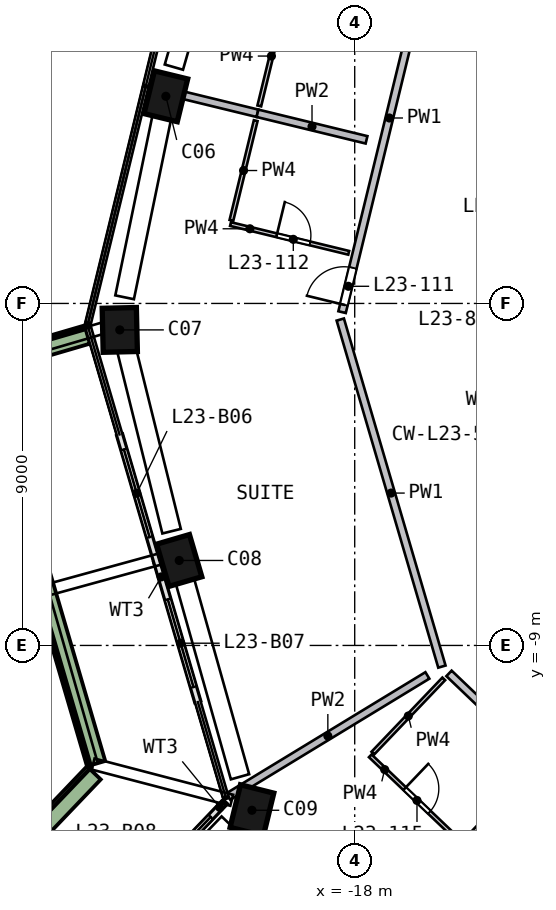
"""IFC4 building model, lengths in metres.
Left out: names, types, materials, properties, quantities, classifications, styles, units other than length and angle.
Written with IfcOpenShell. Run it as: python <this file> out.ifc"""

import sys

from ifc_helpers import new_model, si_unit, direction, frame, frame_2d, origin, origin_2d, place, context, subcontext, project, spatial, rectangle, extrude, element, fill, save


model = new_model("IFC4")
c1 = context("Model", 3, precision=1e-05, world=origin(), true_north=direction((0.0, 1.0)))
c2 = subcontext(c1, "Body", "Model", "MODEL_VIEW")
j1 = project(units=[si_unit("LENGTHUNIT", "METRE"), si_unit("PLANEANGLEUNIT", "RADIAN")], contexts=[c1])
p1 = place(None, origin())
s1 = spatial("IfcSite", under=j1, at=p1, CompositionType="ELEMENT")
p2 = place(p1, origin())
s2 = spatial("IfcBuilding", under=s1, at=p2, CompositionType="ELEMENT")
p3 = place(p2, frame((0.0, 0.0, 100.0)))
s3 = spatial("IfcBuildingStorey", under=s2, at=p3, CompositionType="ELEMENT", Elevation=100.0)
p4 = place(p3, frame((-22.939, 5.583, 0.0), z_axis=(-0.025629126, -0.109285026, 0.993679994), x_axis=(-0.235079586, -0.965473156, -0.112246039)))
e1 = element("IfcColumn", 1, at=p4, inside=s3, PredefinedType="COLUMN", context=c2, shape_type="SweptSolid", body=[
    extrude(rectangle(XDim=1.15, YDim=0.9, at=origin_2d()), origin(), (0.0, 0.0, 1.0), 3.21),
])
p5 = place(p3, frame((-24.186, -0.557, 0.0), z_axis=(0.003573254, -0.114952338, 0.993364582), x_axis=(-0.022433132, 0.993111719, 0.115003771)))
e2 = element("IfcColumn", 2, at=p5, inside=s3, PredefinedType="COLUMN", context=c2, shape_type="SweptSolid", body=[
    extrude(rectangle(XDim=1.15, YDim=0.9, at=origin_2d()), origin(), (0.0, 0.0, 1.0), 3.211),
])
p6 = place(p3, frame((-22.657, -6.634, 0.0), z_axis=(0.032397695, -0.10745996, 0.993681411), x_axis=(0.278746305, -0.953784116, -0.112233498)))
e3 = element("IfcColumn", 3, at=p6, inside=s3, PredefinedType="COLUMN", context=c2, shape_type="SweptSolid", body=[
    extrude(rectangle(XDim=1.15, YDim=0.9, at=origin_2d()), origin(), (0.0, 0.0, 1.0), 3.21),
])
p7 = place(p3, frame((-20.781, -13.219, 0.0), z_axis=(0.063694576, -0.098278146, 0.993118526), x_axis=(0.242274469, 0.966891915, 0.080144286)))
e4 = element("IfcColumn", 4, at=p7, inside=s3, PredefinedType="COLUMN", context=c2, shape_type="SweptSolid", body=[
    extrude(rectangle(XDim=1.15, YDim=0.9, at=origin_2d()), origin(), (0.0, 0.0, 1.0), 3.212),
])
p8 = place(p3, frame((-24.185, -3.461, 0.0), z_axis=(0.0, 0.0, 1.0), x_axis=(0.28096031, -0.959719388, 0.0)))
e5 = element("IfcWall", 5, at=p8, inside=s3, PredefinedType="SOLIDWALL", context=c2, shape_type="SweptSolid", body=[
    extrude(rectangle(XDim=3.475, YDim=0.15, at=frame_2d((1.737, 0.0))), origin(), (0.0, 0.0, 1.0), 2.425),
])
p9 = place(p8, frame((0.4, 0.0, 0.0)))
e6 = element("IfcOpeningElement", 6, at=p9, cuts=e5, PredefinedType="OPENING", context=c2, shape_type="SweptSolid", body=[
    extrude(rectangle(XDim=2.4, YDim=2.4, at=frame_2d((1.2, 1.2))), frame((0.0, 0.085, 0.0), z_axis=(0.0, -1.0, 0.0), x_axis=(1.0, 0.0, 0.0)), (0.0, 0.0, 1.0), 0.17),
])
p10 = place(p3, frame((-23.209, -6.796, 0.0), z_axis=(0.0, 0.0, 1.0), x_axis=(0.281028882, -0.959699311, 0.0)))
e7 = element("IfcWall", 7, at=p10, inside=s3, PredefinedType="SOLIDWALL", context=c2, shape_type="SweptSolid", body=[
    extrude(rectangle(XDim=3.835, YDim=0.15, at=frame_2d((1.918, 0.0))), origin(), (0.0, 0.0, 1.0), 2.425),
])
p11 = place(p10, frame((1.035, 0.0, 0.0)))
e8 = element("IfcOpeningElement", 8, at=p11, cuts=e7, PredefinedType="OPENING", context=c2, shape_type="SweptSolid", body=[
    extrude(rectangle(XDim=2.4, YDim=2.4, at=frame_2d((1.2, 1.2))), frame((0.0, 0.085, 0.0), z_axis=(0.0, -1.0, 0.0), x_axis=(1.0, 0.0, 0.0)), (0.0, 0.0, 1.0), 0.17),
])
p12 = place(p3, frame((-21.448, -13.157, 0.0), z_axis=(0.0, 0.0, 1.0), x_axis=(-0.690648505, -0.723190599, 0.0)))
e9 = element("IfcWall", 9, at=p12, inside=s3, PredefinedType="SOLIDWALL", context=c2, shape_type="SweptSolid", body=[
    extrude(rectangle(XDim=3.293, YDim=0.15, at=frame_2d((1.647, 0.0))), origin(), (0.0, 0.0, 1.0), 2.425),
])
p13 = place(p12, frame((0.494, 0.0, 0.0)))
e10 = element("IfcOpeningElement", 10, at=p13, cuts=e9, PredefinedType="OPENING", context=c2, shape_type="SweptSolid", body=[
    extrude(rectangle(XDim=2.4, YDim=2.4, at=frame_2d((1.2, 1.2))), frame((0.0, 0.085, 0.0), z_axis=(0.0, -1.0, 0.0), x_axis=(1.0, 0.0, 0.0)), (0.0, 0.0, 1.0), 0.17),
])
p14 = place(p3, frame((-25.038, -0.819, 0.0), z_axis=(0.0, 0.0, 1.0), x_axis=(-0.959706288, -0.281005054, 0.0)))
e11 = element("IfcWall", 11, at=p14, inside=s3, PredefinedType="SOLIDWALL", context=c2, shape_type="SweptSolid", body=[
    extrude(rectangle(XDim=3.199, YDim=0.5, at=frame_2d((1.6, 0.0))), origin(), (0.0, 0.0, 1.0), 0.7),
])
p15 = place(p3, frame((-27.798, -1.887, 0.0), z_axis=(0.0, 0.0, 1.0), x_axis=(0.281008423, -0.959705302, 0.0)))
e12 = element("IfcWall", 12, at=p15, inside=s3, PredefinedType="SOLIDWALL", context=c2, shape_type="SweptSolid", body=[
    extrude(rectangle(XDim=10.652, YDim=0.5, at=frame_2d((5.326, 0.0))), origin(), (0.0, 0.0, 1.0), 0.7),
])
p16 = place(p3, frame((-24.864, -12.354, 0.0), z_axis=(0.0, 0.0, 1.0), x_axis=(-0.690631429, -0.723206907, 0.0)))
e13 = element("IfcWall", 13, at=p16, inside=s3, PredefinedType="SOLIDWALL", context=c2, shape_type="SweptSolid", body=[
    extrude(rectangle(XDim=9.361, YDim=0.5, at=frame_2d((4.68, 0.0))), origin(), (0.0, 0.0, 1.0), 0.7),
])
p17 = place(p3, frame((-25.29, -24.89, 0.0), z_axis=(0.0, 0.0, 1.0), x_axis=(0.690632268, 0.723206105, 0.0)))
e14 = element("IfcWall", 14, at=p17, inside=s3, PredefinedType="SOLIDWALL", context=c2, shape_type="SweptSolid", body=[
    extrude(rectangle(XDim=17.508, YDim=0.2, at=frame_2d((8.754, 0.0))), origin(), (0.0, 0.0, 1.0), 3.19),
])
p18 = place(p17, frame((2.3, 0.0, 0.0)))
e15 = element("IfcOpeningElement", 15, at=p18, cuts=e14, PredefinedType="OPENING", context=c2, shape_type="SweptSolid", body=[
    extrude(rectangle(XDim=1.0, YDim=2.1, at=frame_2d((0.5, 1.05))), frame((0.0, 0.11, 0.0), z_axis=(0.0, -1.0, 0.0), x_axis=(1.0, 0.0, 0.0)), (0.0, 0.0, 1.0), 0.22),
])
p19 = place(p3, frame((-11.607, -13.747, 0.0), z_axis=(0.0, 0.0, 1.0), x_axis=(-0.690632268, -0.723206105, 0.0)))
e16 = element("IfcWall", 16, at=p19, inside=s3, PredefinedType="SOLIDWALL", context=c2, shape_type="SweptSolid", body=[
    extrude(rectangle(XDim=17.508, YDim=0.2, at=frame_2d((8.754, 0.0))), origin(), (0.0, 0.0, 1.0), 3.19),
])
p20 = place(p19, frame((6.8, 0.0, 0.0)))
e17 = element("IfcOpeningElement", 17, at=p20, cuts=e16, PredefinedType="OPENING", context=c2, shape_type="SweptSolid", body=[
    extrude(rectangle(XDim=1.0, YDim=2.1, at=frame_2d((0.5, 1.05))), frame((0.0, 0.11, 0.0), z_axis=(0.0, -1.0, 0.0), x_axis=(1.0, 0.0, 0.0)), (0.0, 0.0, 1.0), 0.22),
])
p21 = place(p3, frame((-18.333, -0.229, 0.0), z_axis=(0.0, 0.0, 1.0), x_axis=(0.236500551, 0.971631355, 0.0)))
e18 = element("IfcWall", 18, at=p21, inside=s3, PredefinedType="SOLIDWALL", context=c2, shape_type="SweptSolid", body=[
    extrude(rectangle(XDim=9.116, YDim=0.2, at=frame_2d((4.558, 0.0))), origin(), (0.0, 0.0, 1.0), 3.19),
])
p22 = place(p21, frame((0.2, 0.0, 0.0)))
e19 = element("IfcOpeningElement", 19, at=p22, cuts=e18, PredefinedType="OPENING", context=c2, shape_type="SweptSolid", body=[
    extrude(rectangle(XDim=1.0, YDim=2.1, at=frame_2d((0.5, 1.05))), frame((0.0, 0.11, 0.0), z_axis=(0.0, -1.0, 0.0), x_axis=(1.0, 0.0, 0.0)), (0.0, 0.0, 1.0), 0.22),
])
p23 = place(p3, frame((-18.38, -0.424, 0.0), z_axis=(0.0, 0.0, 1.0), x_axis=(0.280984056, -0.959712436, 0.0)))
e20 = element("IfcWall", 20, at=p23, inside=s3, PredefinedType="SOLIDWALL", context=c2, shape_type="SweptSolid", body=[
    extrude(rectangle(XDim=9.516, YDim=0.2, at=frame_2d((4.758, 0.0))), origin(), (0.0, 0.0, 1.0), 3.19),
])
p24 = place(p3, frame((-15.519, -9.735, 0.0), z_axis=(0.0, 0.0, 1.0), x_axis=(0.723184346, -0.690655053, 0.0)))
e21 = element("IfcWall", 21, at=p24, inside=s3, PredefinedType="SOLIDWALL", context=c2, shape_type="SweptSolid", body=[
    extrude(rectangle(XDim=3.4, YDim=0.2, at=frame_2d((1.7, 0.0))), origin(), (0.0, 0.0, 1.0), 3.19),
])
p25 = place(p3, frame((-20.558, 5.004, 0.0), z_axis=(0.0, 0.0, 1.0), x_axis=(-0.971623409, 0.236533194, 0.0)))
e22 = element("IfcWall", 22, at=p25, inside=s3, PredefinedType="SOLIDWALL", context=c2, shape_type="SweptSolid", body=[
    extrude(rectangle(XDim=2.95, YDim=0.2, at=frame_2d((1.475, 0.0))), origin(), (0.0, 0.0, 1.0), 3.19),
])
p26 = place(p3, frame((-17.689, 4.306, 0.0), z_axis=(0.0, 0.0, 1.0), x_axis=(-0.971636288, 0.236480281, 0.0)))
e23 = element("IfcWall", 23, at=p26, inside=s3, PredefinedType="SOLIDWALL", context=c2, shape_type="SweptSolid", body=[
    extrude(rectangle(XDim=2.953, YDim=0.2, at=frame_2d((1.476, 0.0))), origin(), (0.0, 0.0, 1.0), 3.19),
])
p27 = place(p3, frame((-16.088, -9.789, 0.0), z_axis=(0.0, 0.0, 1.0), x_axis=(-0.854272356, -0.519825684, 0.0)))
e24 = element("IfcWall", 24, at=p27, inside=s3, PredefinedType="SOLIDWALL", context=c2, shape_type="SweptSolid", body=[
    extrude(rectangle(XDim=6.132, YDim=0.2, at=frame_2d((3.066, 0.0))), origin(), (0.0, 0.0, 1.0), 3.19),
])
p28 = place(p3, frame((-21.244, 2.186, 0.0), z_axis=(0.0, 0.0, 1.0), x_axis=(0.23646695, 0.971639533, 0.0)))
e25 = element("IfcWall", 25, at=p28, inside=s3, PredefinedType="PARTITIONING", context=c2, shape_type="SweptSolid", body=[
    extrude(rectangle(XDim=2.7, YDim=0.1, at=frame_2d((1.35, 0.0))), origin(), (0.0, 0.0, 1.0), 3.19),
])
p29 = place(p3, frame((-19.872, 7.822, 0.0), z_axis=(0.0, 0.0, 1.0), x_axis=(-0.236446175, -0.971644588, 0.0)))
e26 = element("IfcWall", 26, at=p29, inside=s3, PredefinedType="PARTITIONING", context=c2, shape_type="SweptSolid", body=[
    extrude(rectangle(XDim=2.7, YDim=0.1, at=frame_2d((1.35, 0.0))), origin(), (0.0, 0.0, 1.0), 3.19),
])
p30 = place(p3, frame((-21.268, 2.089, 0.0), z_axis=(0.0, 0.0, 1.0), x_axis=(0.971627336, -0.236517059, 0.0)))
e27 = element("IfcWall", 27, at=p30, inside=s3, PredefinedType="PARTITIONING", context=c2, shape_type="SweptSolid", body=[
    extrude(rectangle(XDim=3.2, YDim=0.1, at=frame_2d((1.6, 0.0))), origin(), (0.0, 0.0, 1.0), 3.19),
])
p31 = place(p30, frame((1.25, 0.0, 0.0)))
e28 = element("IfcOpeningElement", 28, at=p31, cuts=e27, PredefinedType="OPENING", context=c2, shape_type="SweptSolid", body=[
    extrude(rectangle(XDim=0.9, YDim=2.1, at=frame_2d((0.45, 1.05))), frame((0.0, 0.06, 0.0), z_axis=(0.0, -1.0, 0.0), x_axis=(1.0, 0.0, 0.0)), (0.0, 0.0, 1.0), 0.12),
])
p32 = place(p3, frame((-15.657, -9.88, 0.0), z_axis=(0.0, 0.0, 1.0), x_axis=(-0.690643473, -0.723195404, 0.0)))
e29 = element("IfcWall", 29, at=p32, inside=s3, PredefinedType="PARTITIONING", context=c2, shape_type="SweptSolid", body=[
    extrude(rectangle(XDim=2.7, YDim=0.1, at=frame_2d((1.35, 0.0))), origin(), (0.0, 0.0, 1.0), 3.19),
])
p33 = place(p3, frame((-17.591, -11.905, 0.0), z_axis=(0.0, 0.0, 1.0), x_axis=(0.723208297, -0.690629972, 0.0)))
e30 = element("IfcWall", 30, at=p33, inside=s3, PredefinedType="PARTITIONING", context=c2, shape_type="SweptSolid", body=[
    extrude(rectangle(XDim=3.2, YDim=0.1, at=frame_2d((1.6, 0.0))), origin(), (0.0, 0.0, 1.0), 3.19),
])
p34 = place(p33, frame((1.25, 0.0, 0.0)))
e31 = element("IfcOpeningElement", 31, at=p34, cuts=e30, PredefinedType="OPENING", context=c2, shape_type="SweptSolid", body=[
    extrude(rectangle(XDim=0.9, YDim=2.1, at=frame_2d((0.45, 1.05))), frame((0.0, 0.06, 0.0), z_axis=(0.0, -1.0, 0.0), x_axis=(1.0, 0.0, 0.0)), (0.0, 0.0, 1.0), 0.12),
])
p35 = place(p9, origin())
e32 = element("IfcDoor", 32, at=p35, inside=s3, OperationType="SLIDING_TO_RIGHT", PredefinedType="DOOR", context=c2, shape_type="SweptSolid", body=[
    extrude(rectangle(XDim=2.4, YDim=2.4, at=frame_2d((1.2, 1.2))), frame((0.0, 0.025, 0.0), z_axis=(0.0, -1.0, 0.0), x_axis=(1.0, 0.0, 0.0)), (0.0, 0.0, 1.0), 0.05),
])
fill(e6, e32)
p36 = place(p11, origin())
e33 = element("IfcDoor", 33, at=p36, inside=s3, OperationType="SLIDING_TO_LEFT", PredefinedType="DOOR", context=c2, shape_type="SweptSolid", body=[
    extrude(rectangle(XDim=2.4, YDim=2.4, at=frame_2d((1.2, 1.2))), frame((0.0, 0.025, 0.0), z_axis=(0.0, -1.0, 0.0), x_axis=(1.0, 0.0, 0.0)), (0.0, 0.0, 1.0), 0.05),
])
fill(e8, e33)
p37 = place(p13, origin())
e34 = element("IfcDoor", 34, at=p37, inside=s3, OperationType="SLIDING_TO_LEFT", PredefinedType="DOOR", context=c2, shape_type="SweptSolid", body=[
    extrude(rectangle(XDim=2.4, YDim=2.4, at=frame_2d((1.2, 1.2))), frame((0.0, 0.025, 0.0), z_axis=(0.0, -1.0, 0.0), x_axis=(1.0, 0.0, 0.0)), (0.0, 0.0, 1.0), 0.05),
])
fill(e10, e34)
p38 = place(p22, origin())
e35 = element("IfcDoor", 35, at=p38, inside=s3, OperationType="SINGLE_SWING_LEFT", PredefinedType="DOOR", context=c2, shape_type="SweptSolid", body=[
    extrude(rectangle(XDim=1.0, YDim=2.1, at=frame_2d((0.5, 1.05))), frame((0.0, 0.025, 0.0), z_axis=(0.0, -1.0, 0.0), x_axis=(1.0, 0.0, 0.0)), (0.0, 0.0, 1.0), 0.05),
])
fill(e19, e35)
p39 = place(p31, origin())
e36 = element("IfcDoor", 36, at=p39, inside=s3, OperationType="SINGLE_SWING_LEFT", PredefinedType="DOOR", context=c2, shape_type="SweptSolid", body=[
    extrude(rectangle(XDim=0.9, YDim=2.1, at=frame_2d((0.45, 1.05))), frame((0.0, 0.025, 0.0), z_axis=(0.0, -1.0, 0.0), x_axis=(1.0, 0.0, 0.0)), (0.0, 0.0, 1.0), 0.05),
])
fill(e28, e36)
p40 = place(p34, origin())
e37 = element("IfcDoor", 37, at=p40, inside=s3, OperationType="SINGLE_SWING_LEFT", PredefinedType="DOOR", context=c2, shape_type="SweptSolid", body=[
    extrude(rectangle(XDim=0.9, YDim=2.1, at=frame_2d((0.45, 1.05))), frame((0.0, 0.025, 0.0), z_axis=(0.0, -1.0, 0.0), x_axis=(1.0, 0.0, 0.0)), (0.0, 0.0, 1.0), 0.05),
])
fill(e31, e37)
save(model, sys.argv[1])
